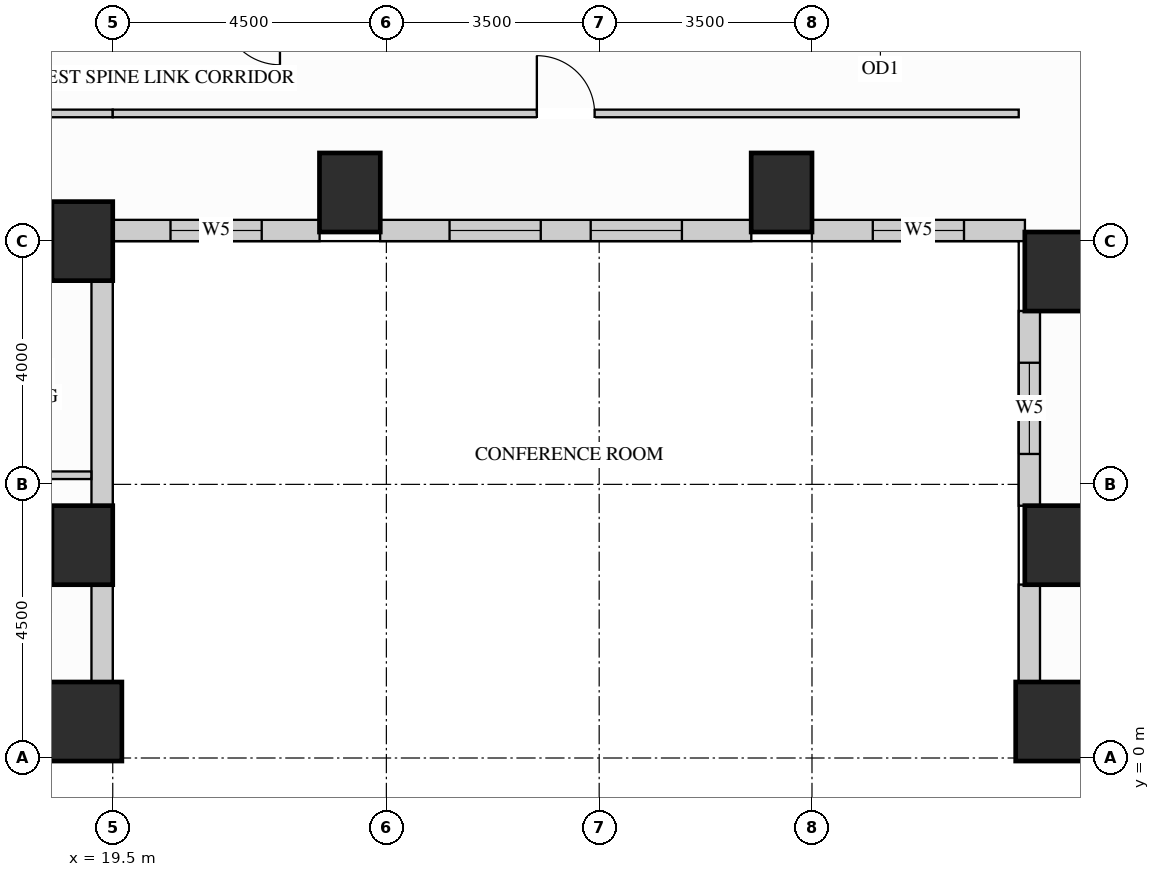
"""IFC4 building model, lengths in metres.
Left out: names, types, materials, properties, quantities, classifications, styles, units other than length and angle.
Written with IfcOpenShell. Run it as: python <this file> out.ifc"""

import sys

from ifc_helpers import new_model, si_unit, direction, frame, frame_2d, origin, origin_2d, place, context, subcontext, project, spatial, rectangle, extrude, source, transform, mapped, element, fill, save


model = new_model("IFC4")
c1 = context("Model", 3, precision=1e-05, world=origin(), true_north=direction((0.0, 1.0)))
c2 = subcontext(c1, "Body", "Model", "MODEL_VIEW")
j1 = project(units=[si_unit("LENGTHUNIT", "METRE"), si_unit("PLANEANGLEUNIT", "RADIAN")], contexts=[c1])
p1 = place(None, origin())
s1 = spatial("IfcSite", under=j1, at=p1, CompositionType="ELEMENT")
p2 = place(p1, origin())
s2 = spatial("IfcBuilding", under=s1, at=p2, CompositionType="ELEMENT")
p3 = place(p2, frame((0.0, 0.0, 22.5)))
s3 = spatial("IfcBuildingStorey", under=s2, at=p3, CompositionType="ELEMENT", Elevation=22.5)
m1 = source(origin(), c2, "Body", "SweptSolid", [
    extrude(rectangle(XDim=1.0, YDim=1.3, at=origin_2d()), origin(), (0.0, 0.0, 1.0), 3.38),
])
for number, where, z_axis, x_axis in (
    (1, (19.0, 3.5, 0.0), (0.0, 0.0, 1.0), (1.0, 0.0, 0.0)),
    (2, (19.0, 8.5, 0.0), (0.0, 0.0, 1.0), (1.0, 0.0, 0.0)),
    (3, (35.0, 3.5, 0.0), (0.0, 0.0, 1.0), (1.0, 0.0, 0.0)),
    (4, (35.0, 8.0, 0.0), (0.0, 0.0, 1.0), (1.0, 0.0, 0.0)),
    (5, (23.4, 9.3, 0.0), (0.0, 0.0, 1.0), (1.0, 0.0, 0.0)),
    (6, (30.5, 9.3, 0.0), (0.0, 0.0, 1.0), (1.0, 0.0, 0.0)),
):
    element("IfcColumn", number, at=place(p3, frame(where, z_axis=z_axis, x_axis=x_axis)), inside=s3, PredefinedType="COLUMN", context=c2, shape_type="MappedRepresentation", body=[
        mapped(m1, transform((0.0, 0.0, 0.0), x_axis=(1.0, 0.0, 0.0), y_axis=(0.0, 1.0, 0.0), z_axis=(0.0, 0.0, 1.0))),
    ])
m2 = source(origin(), c2, "Body", "SweptSolid", [
    extrude(rectangle(XDim=1.3, YDim=1.3, at=origin_2d()), origin(), (0.0, 0.0, 1.0), 3.38),
])
for number, where, z_axis, x_axis in (
    (7, (19.0, 0.6, 0.0), (0.0, 0.0, 1.0), (1.0, 0.0, 0.0)),
    (8, (35.0, 0.6, 0.0), (0.0, 0.0, 1.0), (1.0, 0.0, 0.0)),
):
    element("IfcColumn", number, at=place(p3, frame(where, z_axis=z_axis, x_axis=x_axis)), inside=s3, PredefinedType="COLUMN", context=c2, shape_type="MappedRepresentation", body=[
        mapped(m2, transform((0.0, 0.0, 0.0), x_axis=(1.0, 0.0, 0.0), y_axis=(0.0, 1.0, 0.0), z_axis=(0.0, 0.0, 1.0))),
    ])
m3 = source(origin(), c2, "Body", "SweptSolid", [
    extrude(rectangle(XDim=1.604, YDim=0.35, at=frame_2d((0.802, 0.0))), origin(), (0.0, 0.0, 1.0), 2.51),
])
p4 = place(p3, frame((19.325, 1.248, 0.0), z_axis=(0.0, 0.0, 1.0), x_axis=(0.0, 1.0, 0.0)))
e9 = element("IfcWall", 9, at=p4, inside=s3, PredefinedType="SOLIDWALL", context=c2, shape_type="MappedRepresentation", body=[
    mapped(m3, transform((0.0, 0.0, 0.0), x_axis=(1.0, 0.0, 0.0), y_axis=(0.0, 1.0, 0.0), z_axis=(0.0, 0.0, 1.0))),
])
m4 = source(origin(), c2, "Body", "SweptSolid", [
    extrude(rectangle(XDim=3.704, YDim=0.35, at=frame_2d((1.852, 0.0))), origin(), (0.0, 0.0, 1.0), 2.51),
])
p5 = place(p3, frame((19.325, 4.148, 0.0), z_axis=(0.0, 0.0, 1.0), x_axis=(0.0, 1.0, 0.0)))
e10 = element("IfcWall", 10, at=p5, inside=s3, PredefinedType="SOLIDWALL", context=c2, shape_type="MappedRepresentation", body=[
    mapped(m4, transform((0.0, 0.0, 0.0), x_axis=(1.0, 0.0, 0.0), y_axis=(0.0, 1.0, 0.0), z_axis=(0.0, 0.0, 1.0))),
])
p6 = place(p3, frame((19.498, 8.675, 0.0), z_axis=(0.0, 0.0, 1.0), x_axis=(1.0, 0.0, 0.0)))
e11 = element("IfcWall", 11, at=p6, inside=s3, PredefinedType="SOLIDWALL", context=c2, shape_type="SweptSolid", body=[
    extrude(rectangle(XDim=3.404, YDim=0.35, at=frame_2d((1.702, 0.0))), origin(), (0.0, 0.0, 1.0), 3.365),
])
p7 = place(p6, frame((0.952, 0.0, 0.78)))
e12 = element("IfcOpeningElement", 12, at=p7, cuts=e11, PredefinedType="OPENING", context=c2, shape_type="SweptSolid", body=[
    extrude(rectangle(XDim=1.5, YDim=2.0, at=frame_2d((0.75, 1.0))), frame((0.0, 0.185, 0.0), z_axis=(0.0, -1.0, 0.0), x_axis=(1.0, 0.0, 0.0)), (0.0, 0.0, 1.0), 0.37),
])
p8 = place(p3, frame((23.898, 8.675, 0.0), z_axis=(0.0, 0.0, 1.0), x_axis=(1.0, 0.0, 0.0)))
e13 = element("IfcWall", 13, at=p8, inside=s3, PredefinedType="SOLIDWALL", context=c2, shape_type="SweptSolid", body=[
    extrude(rectangle(XDim=6.104, YDim=0.35, at=frame_2d((3.052, 0.0))), origin(), (0.0, 0.0, 1.0), 3.365),
])
p9 = place(p8, frame((1.141, 0.0, 0.78)))
e14 = element("IfcOpeningElement", 14, at=p9, cuts=e13, PredefinedType="OPENING", context=c2, shape_type="SweptSolid", body=[
    extrude(rectangle(XDim=1.5, YDim=2.0, at=frame_2d((0.75, 1.0))), frame((0.0, 0.185, 0.0), z_axis=(0.0, -1.0, 0.0), x_axis=(1.0, 0.0, 0.0)), (0.0, 0.0, 1.0), 0.37),
])
p10 = place(p8, frame((3.463, 0.0, 0.78)))
e15 = element("IfcOpeningElement", 15, at=p10, cuts=e13, PredefinedType="OPENING", context=c2, shape_type="SweptSolid", body=[
    extrude(rectangle(XDim=1.5, YDim=2.0, at=frame_2d((0.75, 1.0))), frame((0.0, 0.185, 0.0), z_axis=(0.0, -1.0, 0.0), x_axis=(1.0, 0.0, 0.0)), (0.0, 0.0, 1.0), 0.37),
])
p11 = place(p3, frame((30.998, 8.675, 0.0), z_axis=(0.0, 0.0, 1.0), x_axis=(1.0, 0.0, 0.0)))
e16 = element("IfcWall", 16, at=p11, inside=s3, PredefinedType="SOLIDWALL", context=c2, shape_type="SweptSolid", body=[
    extrude(rectangle(XDim=3.504, YDim=0.35, at=frame_2d((1.752, 0.0))), origin(), (0.0, 0.0, 1.0), 3.365),
])
p12 = place(p11, frame((1.002, 0.0, 0.78)))
e17 = element("IfcOpeningElement", 17, at=p12, cuts=e16, PredefinedType="OPENING", context=c2, shape_type="SweptSolid", body=[
    extrude(rectangle(XDim=1.5, YDim=2.0, at=frame_2d((0.75, 1.0))), frame((0.0, 0.185, 0.0), z_axis=(0.0, -1.0, 0.0), x_axis=(1.0, 0.0, 0.0)), (0.0, 0.0, 1.0), 0.37),
])
p13 = place(p3, frame((34.575, 7.352, 0.0), z_axis=(0.0, 0.0, 1.0), x_axis=(0.0, -1.0, 0.0)))
e18 = element("IfcWall", 18, at=p13, inside=s3, PredefinedType="SOLIDWALL", context=c2, shape_type="SweptSolid", body=[
    extrude(rectangle(XDim=3.204, YDim=0.35, at=frame_2d((1.602, 0.0))), origin(), (0.0, 0.0, 1.0), 2.51),
])
p14 = place(p13, frame((0.852, 0.0, 0.78)))
e19 = element("IfcOpeningElement", 19, at=p14, cuts=e18, PredefinedType="OPENING", context=c2, shape_type="SweptSolid", body=[
    extrude(rectangle(XDim=1.5, YDim=1.55, at=frame_2d((0.75, 0.775))), frame((0.0, 0.185, 0.0), z_axis=(0.0, -1.0, 0.0), x_axis=(1.0, 0.0, 0.0)), (0.0, 0.0, 1.0), 0.37),
])
p15 = place(p3, frame((34.575, 2.852, 0.0), z_axis=(0.0, 0.0, 1.0), x_axis=(0.0, -1.0, 0.0)))
e20 = element("IfcWall", 20, at=p15, inside=s3, PredefinedType="SOLIDWALL", context=c2, shape_type="MappedRepresentation", body=[
    mapped(m3, transform((0.0, 0.0, 0.0), x_axis=(1.0, 0.0, 0.0), y_axis=(0.0, 1.0, 0.0), z_axis=(0.0, 0.0, 1.0))),
])
m5 = source(origin(), c2, "Body", "SweptSolid", [
    extrude(rectangle(XDim=2.95, YDim=0.125, at=frame_2d((1.475, 0.0))), origin(), (0.0, 0.0, 1.0), 3.365),
])
p16 = place(p3, frame((16.55, 10.6, 0.0), z_axis=(0.0, 0.0, 1.0), x_axis=(1.0, 0.0, 0.0)))
e21 = element("IfcWall", 21, at=p16, inside=s3, PredefinedType="PARTITIONING", context=c2, shape_type="MappedRepresentation", body=[
    mapped(m5, transform((0.0, 0.0, 0.0), x_axis=(1.0, 0.0, 0.0), y_axis=(0.0, 1.0, 0.0), z_axis=(0.0, 0.0, 1.0))),
])
p17 = place(p3, frame((19.5, 10.6, 0.0), z_axis=(0.0, 0.0, 1.0), x_axis=(1.0, 0.0, 0.0)))
e22 = element("IfcWall", 22, at=p17, inside=s3, PredefinedType="PARTITIONING", context=c2, shape_type="SweptSolid", body=[
    extrude(rectangle(XDim=14.9, YDim=0.125, at=frame_2d((7.45, 0.0))), origin(), (0.0, 0.0, 1.0), 3.365),
])
p18 = place(p17, frame((6.975, 0.0, 0.0)))
e23 = element("IfcOpeningElement", 23, at=p18, cuts=e22, PredefinedType="OPENING", context=c2, shape_type="SweptSolid", body=[
    extrude(rectangle(XDim=0.95, YDim=2.15, at=frame_2d((0.475, 1.075))), frame((0.0, 0.073, 0.0), z_axis=(0.0, -1.0, 0.0), x_axis=(1.0, 0.0, 0.0)), (0.0, 0.0, 1.0), 0.145),
])
m6 = source(origin(), c2, "Body", "SweptSolid", [
    extrude(rectangle(XDim=2.598, YDim=0.125, at=frame_2d((1.299, 0.0))), origin(), (0.0, 0.0, 1.0), 2.828),
])
p19 = place(p3, frame((16.55, 4.65, 0.0), z_axis=(0.0, 0.0, 1.0), x_axis=(1.0, 0.0, 0.0)))
e24 = element("IfcWall", 24, at=p19, inside=s3, PredefinedType="PARTITIONING", context=c2, shape_type="MappedRepresentation", body=[
    mapped(m6, transform((0.0, 0.0, 0.0), x_axis=(1.0, 0.0, 0.0), y_axis=(0.0, 1.0, 0.0), z_axis=(0.0, 0.0, 1.0))),
])
m7 = source(origin(), c2, "Body", "SweptSolid", [
    extrude(rectangle(XDim=0.95, YDim=2.15, at=frame_2d((0.475, 1.075))), frame((0.0, 0.025, 0.0), z_axis=(0.0, -1.0, 0.0), x_axis=(1.0, 0.0, 0.0)), (0.0, 0.0, 1.0), 0.05),
])
p20 = place(p18, origin())
e25 = element("IfcDoor", 25, at=p20, inside=s3, OperationType="SINGLE_SWING_LEFT", PredefinedType="DOOR", context=c2, shape_type="MappedRepresentation", body=[
    mapped(m7, transform((0.0, 0.0, 0.0), x_axis=(1.0, 0.0, 0.0), y_axis=(0.0, 1.0, 0.0), z_axis=(0.0, 0.0, 1.0))),
])
fill(e23, e25)
m8 = source(origin(), c2, "Body", "SweptSolid", [
    extrude(rectangle(XDim=1.5, YDim=2.0, at=frame_2d((0.75, 1.0))), frame((0.0, 0.03, 0.0), z_axis=(0.0, -1.0, 0.0), x_axis=(1.0, 0.0, 0.0)), (0.0, 0.0, 1.0), 0.06),
])
p21 = place(p7, origin())
e26 = element("IfcWindow", 26, at=p21, inside=s3, PartitioningType="SINGLE_PANEL", PredefinedType="WINDOW", context=c2, shape_type="MappedRepresentation", body=[
    mapped(m8, transform((0.0, 0.0, 0.0), x_axis=(1.0, 0.0, 0.0), y_axis=(0.0, 1.0, 0.0), z_axis=(0.0, 0.0, 1.0))),
])
fill(e12, e26)
p22 = place(p9, origin())
e27 = element("IfcWindow", 27, at=p22, inside=s3, PartitioningType="SINGLE_PANEL", PredefinedType="WINDOW", context=c2, shape_type="MappedRepresentation", body=[
    mapped(m8, transform((0.0, 0.0, 0.0), x_axis=(1.0, 0.0, 0.0), y_axis=(0.0, 1.0, 0.0), z_axis=(0.0, 0.0, 1.0))),
])
fill(e14, e27)
p23 = place(p10, origin())
e28 = element("IfcWindow", 28, at=p23, inside=s3, PartitioningType="SINGLE_PANEL", PredefinedType="WINDOW", context=c2, shape_type="MappedRepresentation", body=[
    mapped(m8, transform((0.0, 0.0, 0.0), x_axis=(1.0, 0.0, 0.0), y_axis=(0.0, 1.0, 0.0), z_axis=(0.0, 0.0, 1.0))),
])
fill(e15, e28)
p24 = place(p12, origin())
e29 = element("IfcWindow", 29, at=p24, inside=s3, PartitioningType="SINGLE_PANEL", PredefinedType="WINDOW", context=c2, shape_type="MappedRepresentation", body=[
    mapped(m8, transform((0.0, 0.0, 0.0), x_axis=(1.0, 0.0, 0.0), y_axis=(0.0, 1.0, 0.0), z_axis=(0.0, 0.0, 1.0))),
])
fill(e17, e29)
m9 = source(origin(), c2, "Body", "SweptSolid", [
    extrude(rectangle(XDim=1.5, YDim=1.55, at=frame_2d((0.75, 0.775))), frame((0.0, 0.03, 0.0), z_axis=(0.0, -1.0, 0.0), x_axis=(1.0, 0.0, 0.0)), (0.0, 0.0, 1.0), 0.06),
])
p25 = place(p14, origin())
e30 = element("IfcWindow", 30, at=p25, inside=s3, PartitioningType="SINGLE_PANEL", PredefinedType="WINDOW", context=c2, shape_type="MappedRepresentation", body=[
    mapped(m9, transform((0.0, 0.0, 0.0), x_axis=(1.0, 0.0, 0.0), y_axis=(0.0, 1.0, 0.0), z_axis=(0.0, 0.0, 1.0))),
])
fill(e19, e30)
save(model, sys.argv[1])
